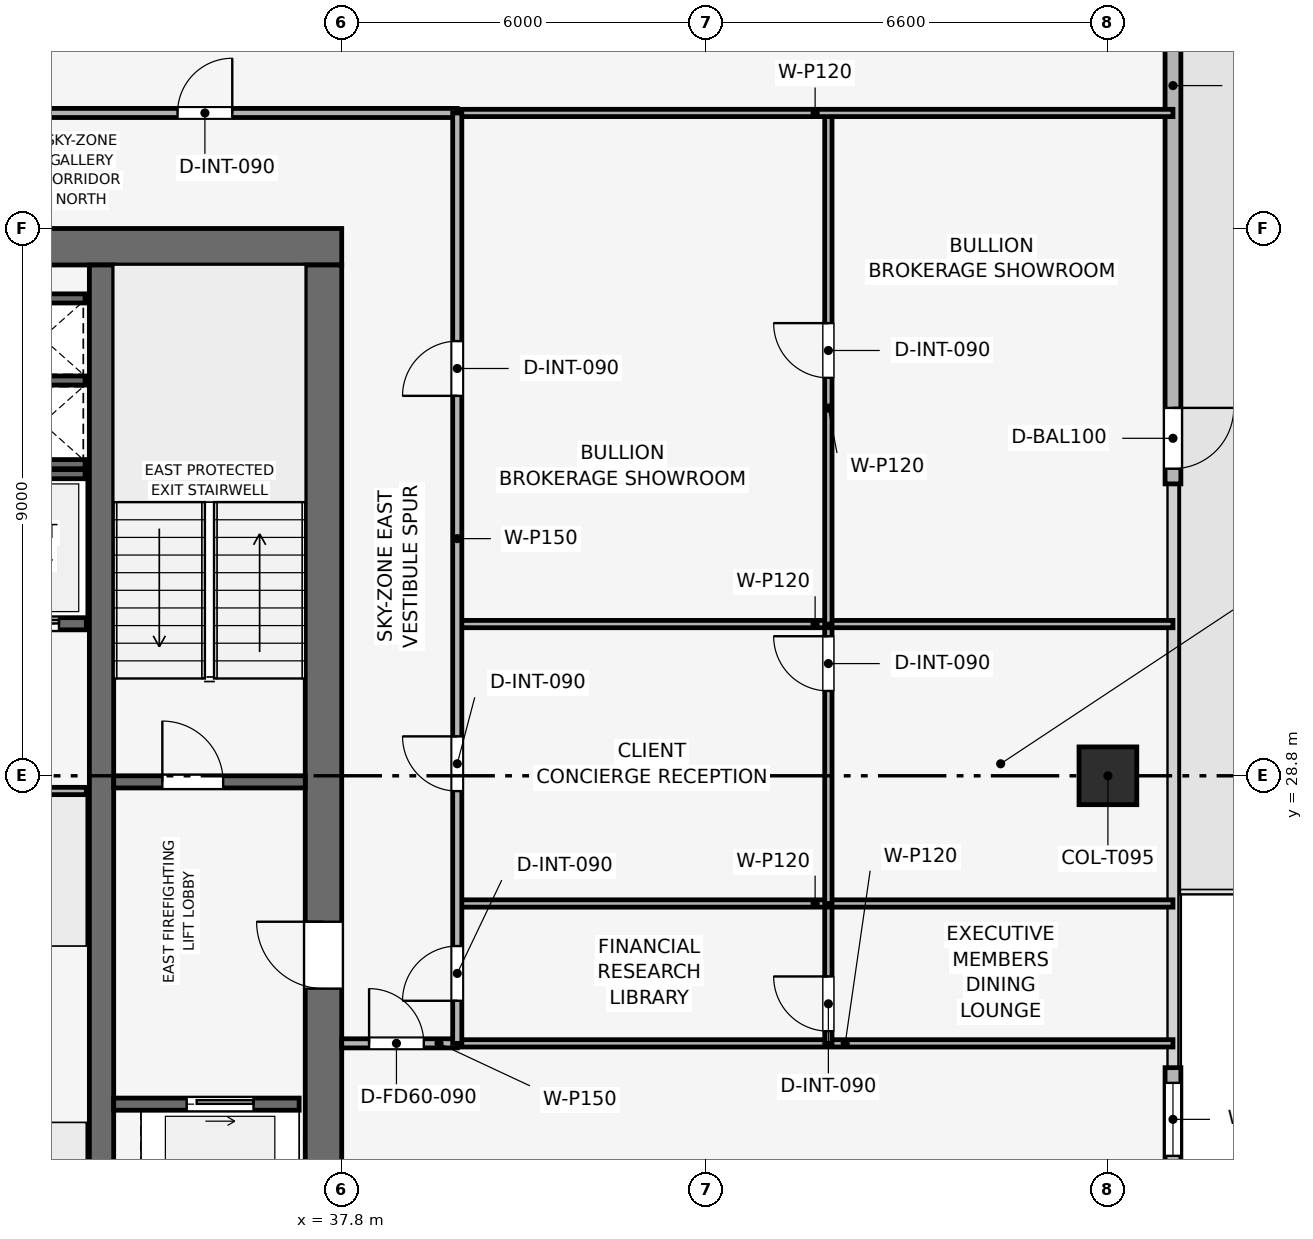
"""IFC4 building model, lengths in metres.
Left out: names, types, materials, properties, quantities, classifications, styles, units other than length and angle.
Written with IfcOpenShell. Run it as: python <this file> out.ifc"""

import sys

from ifc_helpers import new_model, si_unit, direction, frame, frame_2d, origin, origin_2d, place, context, subcontext, project, spatial, rectangle, extrude, element, fill, save


model = new_model("IFC4")
c1 = context("Model", 3, precision=1e-05, world=origin(), true_north=direction((0.0, 1.0)))
c2 = subcontext(c1, "Body", "Model", "MODEL_VIEW")
j1 = project(units=[si_unit("LENGTHUNIT", "METRE"), si_unit("PLANEANGLEUNIT", "RADIAN")], contexts=[c1])
p1 = place(None, origin())
s1 = spatial("IfcSite", under=j1, at=p1, CompositionType="ELEMENT")
p2 = place(p1, origin())
s2 = spatial("IfcBuilding", under=s1, at=p2, CompositionType="ELEMENT")
p3 = place(p2, frame((0.0, 0.0, 318.0)))
s3 = spatial("IfcBuildingStorey", under=s2, at=p3, CompositionType="ELEMENT", Elevation=318.0)
p4 = place(p3, frame((19.8, 37.5, 0.0), z_axis=(0.0, 0.0, 1.0), x_axis=(1.0, 0.0, 0.0)))
e1 = element("IfcWall", 1, at=p4, inside=s3, PredefinedType="SHEAR", context=c2, shape_type="SweptSolid", body=[
    extrude(rectangle(XDim=18.0, YDim=0.6, at=frame_2d((9.0, 0.0))), origin(), (0.0, 0.0, 1.0), 3.75),
])
p5 = place(p4, frame((7.05, 0.0, 0.0)))
e2 = element("IfcOpeningElement", 2, at=p5, cuts=e1, PredefinedType="OPENING", context=c2, shape_type="SweptSolid", body=[
    extrude(rectangle(XDim=1.1, YDim=2.15, at=frame_2d((0.55, 1.075))), frame((0.0, 0.31, 0.0), z_axis=(0.0, -1.0, 0.0), x_axis=(1.0, 0.0, 0.0)), (0.0, 0.0, 1.0), 0.62),
])
p6 = place(p3, frame((37.5, 20.4, 0.0), z_axis=(0.0, 0.0, 1.0), x_axis=(0.0, 1.0, 0.0)))
e3 = element("IfcWall", 3, at=p6, inside=s3, PredefinedType="SHEAR", context=c2, shape_type="SweptSolid", body=[
    extrude(rectangle(XDim=16.8, YDim=0.6, at=frame_2d((8.4, 0.0))), origin(), (0.0, 0.0, 1.0), 3.75),
])
p7 = place(p6, frame((4.9, 0.0, 0.0)))
e4 = element("IfcOpeningElement", 4, at=p7, cuts=e3, PredefinedType="OPENING", context=c2, shape_type="SweptSolid", body=[
    extrude(rectangle(XDim=1.1, YDim=2.15, at=frame_2d((0.55, 1.075))), frame((0.0, 0.31, 0.0), z_axis=(0.0, -1.0, 0.0), x_axis=(1.0, 0.0, 0.0)), (0.0, 0.0, 1.0), 0.62),
])
p8 = place(p3, frame((33.85, 20.4, 0.0), z_axis=(0.0, 0.0, 1.0), x_axis=(0.0, 1.0, 0.0)))
e5 = element("IfcWall", 5, at=p8, inside=s3, PredefinedType="SHEAR", context=c2, shape_type="SweptSolid", body=[
    extrude(rectangle(XDim=16.8, YDim=0.4, at=frame_2d((8.4, 0.0))), origin(), (0.0, 0.0, 1.0), 3.75),
])
p9 = place(p3, frame((50.4, 28.8, 0.003), z_axis=(0.0, 0.0, 1.0), x_axis=(1.0, 0.0, 0.0)))
e6 = element("IfcColumn", 6, at=p9, inside=s3, PredefinedType="COLUMN", context=c2, shape_type="SweptSolid", body=[
    extrude(rectangle(XDim=0.95, YDim=0.95, at=origin_2d()), origin(), (0.0, 0.0, 1.0), 3.504),
])
p10 = place(p3, frame((51.47, 45.3, 0.0), z_axis=(0.0, 0.0, 1.0), x_axis=(0.0, -1.0, 0.0)))
e7 = element("IfcWall", 7, at=p10, inside=s3, PredefinedType="SOLIDWALL", context=c2, shape_type="SweptSolid", body=[
    extrude(rectangle(XDim=11.7, YDim=0.26, at=frame_2d((5.85, 0.0))), origin(), (0.0, 0.0, 1.0), 3.51),
])
p11 = place(p10, frame((10.45, 0.0, 0.0)))
e8 = element("IfcOpeningElement", 8, at=p11, cuts=e7, PredefinedType="OPENING", context=c2, shape_type="SweptSolid", body=[
    extrude(rectangle(XDim=1.0, YDim=2.2, at=frame_2d((0.5, 1.1))), frame((0.0, 0.14, 0.0), z_axis=(0.0, -1.0, 0.0), x_axis=(1.0, 0.0, 0.0)), (0.0, 0.0, 1.0), 0.28),
])
p12 = place(p3, frame((51.47, 24.0, 0.0), z_axis=(0.0, 0.0, 1.0), x_axis=(0.0, -1.0, 0.0)))
e9 = element("IfcWall", 9, at=p12, inside=s3, PredefinedType="SOLIDWALL", context=c2, shape_type="SweptSolid", body=[
    extrude(rectangle(XDim=11.7, YDim=0.26, at=frame_2d((5.85, 0.0))), origin(), (0.0, 0.0, 1.0), 3.51),
])
p13 = place(p12, frame((0.25, 0.0, 0.9)))
e10 = element("IfcOpeningElement", 10, at=p13, cuts=e9, PredefinedType="OPENING", context=c2, shape_type="SweptSolid", body=[
    extrude(rectangle(XDim=1.2, YDim=2.1, at=frame_2d((0.6, 1.05))), frame((0.0, 0.14, 0.0), z_axis=(0.0, -1.0, 0.0), x_axis=(1.0, 0.0, 0.0)), (0.0, 0.0, 1.0), 0.28),
])
p14 = place(p3, frame((34.05, 28.7, 0.0), z_axis=(0.0, 0.0, 1.0), x_axis=(1.0, 0.0, 0.0)))
e11 = element("IfcWall", 11, at=p14, inside=s3, PredefinedType="SHEAR", context=c2, shape_type="SweptSolid", body=[
    extrude(rectangle(XDim=3.15, YDim=0.2, at=frame_2d((1.575, 0.0))), origin(), (0.0, 0.0, 1.0), 3.51),
])
p15 = place(p14, frame((0.8, 0.0, 0.0)))
e12 = element("IfcOpeningElement", 12, at=p15, cuts=e11, PredefinedType="OPENING", context=c2, shape_type="SweptSolid", body=[
    extrude(rectangle(XDim=1.0, YDim=2.1, at=frame_2d((0.5, 1.05))), frame((0.0, 0.11, 0.0), z_axis=(0.0, -1.0, 0.0), x_axis=(1.0, 0.0, 0.0)), (0.0, 0.0, 1.0), 0.22),
])
for number, where, z_axis, x_axis in (
    (13, (32.25, 33.925, 0.0), (0.0, 0.0, 1.0), (1.0, 0.0, 0.0)),
    (14, (32.25, 35.3, 0.0), (0.0, 0.0, 1.0), (1.0, 0.0, 0.0)),
):
    element("IfcWall", number, at=place(p3, frame(where, z_axis=z_axis, x_axis=x_axis)), inside=s3, PredefinedType="SHEAR", context=c2, shape_type="SweptSolid", body=[
        extrude(rectangle(XDim=1.33, YDim=0.15, at=frame_2d((0.665, 0.0))), origin(), (0.0, 0.0, 1.0), 3.51),
    ])
p16 = place(p3, frame((34.05, 23.4, 0.0), z_axis=(0.0, 0.0, 1.0), x_axis=(1.0, 0.0, 0.0)))
e15 = element("IfcWall", 15, at=p16, inside=s3, PredefinedType="SHEAR", context=c2, shape_type="SweptSolid", body=[
    extrude(rectangle(XDim=3.05, YDim=0.2, at=frame_2d((1.525, 0.0))), origin(), (0.0, 0.0, 1.0), 3.51),
])
p17 = place(p16, frame((1.2, 0.0, 0.0)))
e16 = element("IfcOpeningElement", 16, at=p17, cuts=e15, PredefinedType="OPENING", context=c2, shape_type="SweptSolid", body=[
    extrude(rectangle(XDim=1.1, YDim=2.15, at=frame_2d((0.55, 1.075))), frame((0.0, 0.11, 0.0), z_axis=(0.0, -1.0, 0.0), x_axis=(1.0, 0.0, 0.0)), (0.0, 0.0, 1.0), 0.22),
])
p18 = place(p3, frame((31.6, 31.3, 0.0), z_axis=(0.0, 0.0, 1.0), x_axis=(1.0, 0.0, 0.0)))
e17 = element("IfcWall", 17, at=p18, inside=s3, PredefinedType="SHEAR", context=c2, shape_type="SweptSolid", body=[
    extrude(rectangle(XDim=2.0, YDim=0.2, at=frame_2d((1.0, 0.0))), origin(), (0.0, 0.0, 1.0), 3.51),
])
p19 = place(p18, frame((0.45, 0.0, 0.0)))
e18 = element("IfcOpeningElement", 18, at=p19, cuts=e17, PredefinedType="OPENING", context=c2, shape_type="SweptSolid", body=[
    extrude(rectangle(XDim=1.1, YDim=2.15, at=frame_2d((0.55, 1.075))), frame((0.0, 0.11, 0.0), z_axis=(0.0, -1.0, 0.0), x_axis=(1.0, 0.0, 0.0)), (0.0, 0.0, 1.0), 0.22),
])
p20 = place(p3, frame((32.25, 36.65, 0.0), z_axis=(0.0, 0.0, 1.0), x_axis=(1.0, 0.0, 0.0)))
e19 = element("IfcWall", 19, at=p20, inside=s3, PredefinedType="SHEAR", context=c2, shape_type="SweptSolid", body=[
    extrude(rectangle(XDim=1.33, YDim=0.15, at=frame_2d((0.665, 0.0))), origin(), (0.0, 0.0, 1.0), 3.51),
])
p21 = place(p3, frame((29.5, 33.76, 0.0), z_axis=(0.0, 0.0, 1.0), x_axis=(1.0, 0.0, 0.0)))
e20 = element("IfcWall", 20, at=p21, inside=s3, PredefinedType="SHEAR", context=c2, shape_type="SweptSolid", body=[
    extrude(rectangle(XDim=4.08, YDim=0.15, at=frame_2d((2.04, 0.0))), origin(), (0.0, 0.0, 1.0), 3.51),
])
p22 = place(p3, frame((29.55, 28.55, 0.0), z_axis=(0.0, 0.0, 1.0), x_axis=(1.0, 0.0, 0.0)))
e21 = element("IfcWall", 21, at=p22, inside=s3, PredefinedType="PARTITIONING", context=c2, shape_type="SweptSolid", body=[
    extrude(rectangle(XDim=4.05, YDim=0.12, at=frame_2d((2.025, 0.0))), origin(), (0.0, 0.0, 1.0), 3.51),
])
p23 = place(p22, frame((1.575, 0.0, 0.0)))
e22 = element("IfcOpeningElement", 22, at=p23, cuts=e21, PredefinedType="OPENING", context=c2, shape_type="SweptSolid", body=[
    extrude(rectangle(XDim=0.9, YDim=2.1, at=frame_2d((0.45, 1.05))), frame((0.0, 0.07, 0.0), z_axis=(0.0, -1.0, 0.0), x_axis=(1.0, 0.0, 0.0)), (0.0, 0.0, 1.0), 0.14),
])
p24 = place(p3, frame((37.8, 24.4, 0.0), z_axis=(0.0, 0.0, 1.0), x_axis=(1.0, 0.0, 0.0)))
e23 = element("IfcWall", 23, at=p24, inside=s3, PredefinedType="PARTITIONING", context=c2, shape_type="SweptSolid", body=[
    extrude(rectangle(XDim=1.9, YDim=0.15, at=frame_2d((0.95, 0.0))), origin(), (0.0, 0.0, 1.0), 3.51),
])
p25 = place(p24, frame((0.45, 0.0, 0.0)))
e24 = element("IfcOpeningElement", 24, at=p25, cuts=e23, PredefinedType="OPENING", context=c2, shape_type="SweptSolid", body=[
    extrude(rectangle(XDim=0.9, YDim=2.1, at=frame_2d((0.45, 1.05))), frame((0.0, 0.085, 0.0), z_axis=(0.0, -1.0, 0.0), x_axis=(1.0, 0.0, 0.0)), (0.0, 0.0, 1.0), 0.17),
])
p26 = place(p3, frame((39.7, 24.4, 0.0), z_axis=(0.0, 0.0, 1.0), x_axis=(1.0, 0.0, 0.0)))
e25 = element("IfcWall", 25, at=p26, inside=s3, PredefinedType="PARTITIONING", context=c2, shape_type="SweptSolid", body=[
    extrude(rectangle(XDim=11.77, YDim=0.12, at=frame_2d((5.885, 0.0))), origin(), (0.0, 0.0, 1.0), 3.135),
])
p27 = place(p3, frame((45.803, 24.4, 0.0), z_axis=(0.0, 0.0, 1.0), x_axis=(0.0, 1.0, 0.0)))
e26 = element("IfcWall", 26, at=p27, inside=s3, PredefinedType="PARTITIONING", context=c2, shape_type="SweptSolid", body=[
    extrude(rectangle(XDim=2.3, YDim=0.12, at=frame_2d((1.15, 0.0))), origin(), (0.0, 0.0, 1.0), 3.51),
])
p28 = place(p27, frame((0.2, 0.0, 0.0)))
e27 = element("IfcOpeningElement", 27, at=p28, cuts=e26, PredefinedType="OPENING", context=c2, shape_type="SweptSolid", body=[
    extrude(rectangle(XDim=0.9, YDim=2.1, at=frame_2d((0.45, 1.05))), frame((0.0, 0.07, 0.0), z_axis=(0.0, -1.0, 0.0), x_axis=(1.0, 0.0, 0.0)), (0.0, 0.0, 1.0), 0.14),
])
p29 = place(p3, frame((39.7, 26.7, 0.0), z_axis=(0.0, 0.0, 1.0), x_axis=(1.0, 0.0, 0.0)))
e28 = element("IfcWall", 28, at=p29, inside=s3, PredefinedType="PARTITIONING", context=c2, shape_type="SweptSolid", body=[
    extrude(rectangle(XDim=11.77, YDim=0.12, at=frame_2d((5.885, 0.0))), origin(), (0.0, 0.0, 1.0), 3.135),
])
p30 = place(p3, frame((45.803, 26.7, 0.0), z_axis=(0.0, 0.0, 1.0), x_axis=(0.0, 1.0, 0.0)))
e29 = element("IfcWall", 29, at=p30, inside=s3, PredefinedType="PARTITIONING", context=c2, shape_type="SweptSolid", body=[
    extrude(rectangle(XDim=4.595, YDim=0.12, at=frame_2d((2.297, 0.0))), origin(), (0.0, 0.0, 1.0), 3.095),
])
p31 = place(p30, frame((3.495, 0.0, 0.0)))
e30 = element("IfcOpeningElement", 30, at=p31, cuts=e29, PredefinedType="OPENING", context=c2, shape_type="SweptSolid", body=[
    extrude(rectangle(XDim=0.9, YDim=2.1, at=frame_2d((0.45, 1.05))), frame((0.0, 0.07, 0.0), z_axis=(0.0, -1.0, 0.0), x_axis=(1.0, 0.0, 0.0)), (0.0, 0.0, 1.0), 0.14),
])
p32 = place(p3, frame((39.7, 31.295, 0.0), z_axis=(0.0, 0.0, 1.0), x_axis=(1.0, 0.0, 0.0)))
e31 = element("IfcWall", 31, at=p32, inside=s3, PredefinedType="PARTITIONING", context=c2, shape_type="SweptSolid", body=[
    extrude(rectangle(XDim=11.77, YDim=0.12, at=frame_2d((5.885, 0.0))), origin(), (0.0, 0.0, 1.0), 3.135),
])
p33 = place(p3, frame((45.803, 31.295, 0.0), z_axis=(0.0, 0.0, 1.0), x_axis=(0.0, 1.0, 0.0)))
e32 = element("IfcWall", 32, at=p33, inside=s3, PredefinedType="PARTITIONING", context=c2, shape_type="SweptSolid", body=[
    extrude(rectangle(XDim=8.405, YDim=0.12, at=frame_2d((4.203, 0.0))), origin(), (0.0, 0.0, 1.0), 3.095),
])
p34 = place(p33, frame((4.049, 0.0, 0.0)))
e33 = element("IfcOpeningElement", 33, at=p34, cuts=e32, PredefinedType="OPENING", context=c2, shape_type="SweptSolid", body=[
    extrude(rectangle(XDim=0.9, YDim=2.1, at=frame_2d((0.45, 1.05))), frame((0.0, 0.07, 0.0), z_axis=(0.0, -1.0, 0.0), x_axis=(1.0, 0.0, 0.0)), (0.0, 0.0, 1.0), 0.14),
])
p35 = place(p3, frame((39.7, 39.7, 0.0), z_axis=(0.0, 0.0, 1.0), x_axis=(1.0, 0.0, 0.0)))
e34 = element("IfcWall", 34, at=p35, inside=s3, PredefinedType="PARTITIONING", context=c2, shape_type="SweptSolid", body=[
    extrude(rectangle(XDim=11.77, YDim=0.12, at=frame_2d((5.885, 0.0))), origin(), (0.0, 0.0, 1.0), 3.095),
])
p36 = place(p3, frame((17.9, 39.7, 0.0), z_axis=(0.0, 0.0, 1.0), x_axis=(1.0, 0.0, 0.0)))
e35 = element("IfcWall", 35, at=p36, inside=s3, PredefinedType="PARTITIONING", context=c2, shape_type="SweptSolid", body=[
    extrude(rectangle(XDim=21.8, YDim=0.15, at=frame_2d((10.9, 0.0))), origin(), (0.0, 0.0, 1.0), 3.095),
])
p37 = place(p36, frame((2.1, 0.0, 0.0)))
e36 = element("IfcOpeningElement", 36, at=p37, cuts=e35, PredefinedType="OPENING", context=c2, shape_type="SweptSolid", body=[
    extrude(rectangle(XDim=0.9, YDim=2.1, at=frame_2d((0.45, 1.05))), frame((0.0, 0.085, 0.0), z_axis=(0.0, -1.0, 0.0), x_axis=(1.0, 0.0, 0.0)), (0.0, 0.0, 1.0), 0.17),
])
p38 = place(p36, frame((6.05, 0.0, 0.0)))
e37 = element("IfcOpeningElement", 37, at=p38, cuts=e35, PredefinedType="OPENING", context=c2, shape_type="SweptSolid", body=[
    extrude(rectangle(XDim=0.9, YDim=2.1, at=frame_2d((0.45, 1.05))), frame((0.0, 0.085, 0.0), z_axis=(0.0, -1.0, 0.0), x_axis=(1.0, 0.0, 0.0)), (0.0, 0.0, 1.0), 0.17),
])
p39 = place(p36, frame((8.95, 0.0, 0.0)))
e38 = element("IfcOpeningElement", 38, at=p39, cuts=e35, PredefinedType="OPENING", context=c2, shape_type="SweptSolid", body=[
    extrude(rectangle(XDim=0.9, YDim=2.1, at=frame_2d((0.45, 1.05))), frame((0.0, 0.085, 0.0), z_axis=(0.0, -1.0, 0.0), x_axis=(1.0, 0.0, 0.0)), (0.0, 0.0, 1.0), 0.17),
])
p40 = place(p36, frame((11.7, 0.0, 0.0)))
e39 = element("IfcOpeningElement", 39, at=p40, cuts=e35, PredefinedType="OPENING", context=c2, shape_type="SweptSolid", body=[
    extrude(rectangle(XDim=0.95, YDim=2.1, at=frame_2d((0.475, 1.05))), frame((0.0, 0.085, 0.0), z_axis=(0.0, -1.0, 0.0), x_axis=(1.0, 0.0, 0.0)), (0.0, 0.0, 1.0), 0.17),
])
p41 = place(p36, frame((17.2, 0.0, 0.0)))
e40 = element("IfcOpeningElement", 40, at=p41, cuts=e35, PredefinedType="OPENING", context=c2, shape_type="SweptSolid", body=[
    extrude(rectangle(XDim=0.9, YDim=2.1, at=frame_2d((0.45, 1.05))), frame((0.0, 0.085, 0.0), z_axis=(0.0, -1.0, 0.0), x_axis=(1.0, 0.0, 0.0)), (0.0, 0.0, 1.0), 0.17),
])
p42 = place(p3, frame((39.7, 24.4, 0.0), z_axis=(0.0, 0.0, 1.0), x_axis=(0.0, 1.0, 0.0)))
e41 = element("IfcWall", 41, at=p42, inside=s3, PredefinedType="PARTITIONING", context=c2, shape_type="SweptSolid", body=[
    extrude(rectangle(XDim=15.3, YDim=0.15, at=frame_2d((7.65, 0.0))), origin(), (0.0, 0.0, 1.0), 3.095),
])
p43 = place(p42, frame((0.7, 0.0, 0.0)))
e42 = element("IfcOpeningElement", 42, at=p43, cuts=e41, PredefinedType="OPENING", context=c2, shape_type="SweptSolid", body=[
    extrude(rectangle(XDim=0.9, YDim=2.1, at=frame_2d((0.45, 1.05))), frame((0.0, 0.085, 0.0), z_axis=(0.0, -1.0, 0.0), x_axis=(1.0, 0.0, 0.0)), (0.0, 0.0, 1.0), 0.17),
])
p44 = place(p42, frame((4.148, 0.0, 0.0)))
e43 = element("IfcOpeningElement", 43, at=p44, cuts=e41, PredefinedType="OPENING", context=c2, shape_type="SweptSolid", body=[
    extrude(rectangle(XDim=0.9, YDim=2.1, at=frame_2d((0.45, 1.05))), frame((0.0, 0.085, 0.0), z_axis=(0.0, -1.0, 0.0), x_axis=(1.0, 0.0, 0.0)), (0.0, 0.0, 1.0), 0.17),
])
p45 = place(p42, frame((10.648, 0.0, 0.0)))
e44 = element("IfcOpeningElement", 44, at=p45, cuts=e41, PredefinedType="OPENING", context=c2, shape_type="SweptSolid", body=[
    extrude(rectangle(XDim=0.9, YDim=2.1, at=frame_2d((0.45, 1.05))), frame((0.0, 0.085, 0.0), z_axis=(0.0, -1.0, 0.0), x_axis=(1.0, 0.0, 0.0)), (0.0, 0.0, 1.0), 0.17),
])
p46 = place(p11, origin())
e45 = element("IfcDoor", 45, at=p46, inside=s3, OperationType="SINGLE_SWING_LEFT", PredefinedType="DOOR", context=c2, shape_type="SweptSolid", body=[
    extrude(rectangle(XDim=1.0, YDim=2.2, at=frame_2d((0.5, 1.1))), frame((0.0, 0.025, 0.0), z_axis=(0.0, -1.0, 0.0), x_axis=(1.0, 0.0, 0.0)), (0.0, 0.0, 1.0), 0.05),
])
fill(e8, e45)
p47 = place(p13, origin())
e46 = element("IfcWindow", 46, at=p47, inside=s3, PartitioningType="SINGLE_PANEL", PredefinedType="WINDOW", context=c2, shape_type="SweptSolid", body=[
    extrude(rectangle(XDim=1.2, YDim=2.1, at=frame_2d((0.6, 1.05))), frame((0.0, 0.03, 0.0), z_axis=(0.0, -1.0, 0.0), x_axis=(1.0, 0.0, 0.0)), (0.0, 0.0, 1.0), 0.06),
])
fill(e10, e46)
p48 = place(p15, origin())
e47 = element("IfcDoor", 47, at=p48, inside=s3, OperationType="SINGLE_SWING_LEFT", PredefinedType="DOOR", context=c2, shape_type="SweptSolid", body=[
    extrude(rectangle(XDim=1.0, YDim=2.1, at=frame_2d((0.5, 1.05))), frame((0.0, 0.025, 0.0), z_axis=(0.0, -1.0, 0.0), x_axis=(1.0, 0.0, 0.0)), (0.0, 0.0, 1.0), 0.05),
])
fill(e12, e47)
p49 = place(p17, origin())
e48 = element("IfcDoor", 48, at=p49, inside=s3, OperationType="SLIDING_TO_RIGHT", PredefinedType="DOOR", context=c2, shape_type="SweptSolid", body=[
    extrude(rectangle(XDim=1.1, YDim=2.15, at=frame_2d((0.55, 1.075))), frame((0.0, 0.025, 0.0), z_axis=(0.0, -1.0, 0.0), x_axis=(1.0, 0.0, 0.0)), (0.0, 0.0, 1.0), 0.05),
])
fill(e16, e48)
p50 = place(p19, origin())
e49 = element("IfcDoor", 49, at=p50, inside=s3, OperationType="SLIDING_TO_RIGHT", PredefinedType="DOOR", context=c2, shape_type="SweptSolid", body=[
    extrude(rectangle(XDim=1.1, YDim=2.15, at=frame_2d((0.55, 1.075))), frame((0.0, 0.025, 0.0), z_axis=(0.0, -1.0, 0.0), x_axis=(1.0, 0.0, 0.0)), (0.0, 0.0, 1.0), 0.05),
])
fill(e18, e49)
p51 = place(p25, origin())
e50 = element("IfcDoor", 50, at=p51, inside=s3, OperationType="SINGLE_SWING_LEFT", PredefinedType="DOOR", context=c2, shape_type="SweptSolid", body=[
    extrude(rectangle(XDim=0.9, YDim=2.1, at=frame_2d((0.45, 1.05))), frame((0.0, 0.025, 0.0), z_axis=(0.0, -1.0, 0.0), x_axis=(1.0, 0.0, 0.0)), (0.0, 0.0, 1.0), 0.05),
])
fill(e24, e50)
p52 = place(p28, origin())
e51 = element("IfcDoor", 51, at=p52, inside=s3, OperationType="SINGLE_SWING_RIGHT", PredefinedType="DOOR", context=c2, shape_type="SweptSolid", body=[
    extrude(rectangle(XDim=0.9, YDim=2.1, at=frame_2d((0.45, 1.05))), frame((0.0, 0.025, 0.0), z_axis=(0.0, -1.0, 0.0), x_axis=(1.0, 0.0, 0.0)), (0.0, 0.0, 1.0), 0.05),
])
fill(e27, e51)
p53 = place(p31, origin())
e52 = element("IfcDoor", 52, at=p53, inside=s3, OperationType="SINGLE_SWING_RIGHT", PredefinedType="DOOR", context=c2, shape_type="SweptSolid", body=[
    extrude(rectangle(XDim=0.9, YDim=2.1, at=frame_2d((0.45, 1.05))), frame((0.0, 0.025, 0.0), z_axis=(0.0, -1.0, 0.0), x_axis=(1.0, 0.0, 0.0)), (0.0, 0.0, 1.0), 0.05),
])
fill(e30, e52)
p54 = place(p34, origin())
e53 = element("IfcDoor", 53, at=p54, inside=s3, OperationType="SINGLE_SWING_RIGHT", PredefinedType="DOOR", context=c2, shape_type="SweptSolid", body=[
    extrude(rectangle(XDim=0.9, YDim=2.1, at=frame_2d((0.45, 1.05))), frame((0.0, 0.025, 0.0), z_axis=(0.0, -1.0, 0.0), x_axis=(1.0, 0.0, 0.0)), (0.0, 0.0, 1.0), 0.05),
])
fill(e33, e53)
p55 = place(p41, origin())
e54 = element("IfcDoor", 54, at=p55, inside=s3, OperationType="SINGLE_SWING_RIGHT", PredefinedType="DOOR", context=c2, shape_type="SweptSolid", body=[
    extrude(rectangle(XDim=0.9, YDim=2.1, at=frame_2d((0.45, 1.05))), frame((0.0, 0.025, 0.0), z_axis=(0.0, -1.0, 0.0), x_axis=(1.0, 0.0, 0.0)), (0.0, 0.0, 1.0), 0.05),
])
fill(e40, e54)
p56 = place(p43, origin())
e55 = element("IfcDoor", 55, at=p56, inside=s3, OperationType="SINGLE_SWING_LEFT", PredefinedType="DOOR", context=c2, shape_type="SweptSolid", body=[
    extrude(rectangle(XDim=0.9, YDim=2.1, at=frame_2d((0.45, 1.05))), frame((0.0, 0.025, 0.0), z_axis=(0.0, -1.0, 0.0), x_axis=(1.0, 0.0, 0.0)), (0.0, 0.0, 1.0), 0.05),
])
fill(e42, e55)
p57 = place(p44, origin())
e56 = element("IfcDoor", 56, at=p57, inside=s3, OperationType="SINGLE_SWING_RIGHT", PredefinedType="DOOR", context=c2, shape_type="SweptSolid", body=[
    extrude(rectangle(XDim=0.9, YDim=2.1, at=frame_2d((0.45, 1.05))), frame((0.0, 0.025, 0.0), z_axis=(0.0, -1.0, 0.0), x_axis=(1.0, 0.0, 0.0)), (0.0, 0.0, 1.0), 0.05),
])
fill(e43, e56)
p58 = place(p45, origin())
e57 = element("IfcDoor", 57, at=p58, inside=s3, OperationType="SINGLE_SWING_LEFT", PredefinedType="DOOR", context=c2, shape_type="SweptSolid", body=[
    extrude(rectangle(XDim=0.9, YDim=2.1, at=frame_2d((0.45, 1.05))), frame((0.0, 0.025, 0.0), z_axis=(0.0, -1.0, 0.0), x_axis=(1.0, 0.0, 0.0)), (0.0, 0.0, 1.0), 0.05),
])
fill(e44, e57)
p59 = place(p7, origin())
e58 = element("IfcDoor", 58, at=p59, inside=s3, OperationType="SINGLE_SWING_RIGHT", PredefinedType="DOOR", context=c2, shape_type="SweptSolid", body=[
    extrude(rectangle(XDim=1.1, YDim=2.15, at=frame_2d((0.55, 1.075))), frame((0.0, 0.025, 0.0), z_axis=(0.0, -1.0, 0.0), x_axis=(1.0, 0.0, 0.0)), (0.0, 0.0, 1.0), 0.05),
])
fill(e4, e58)
save(model, sys.argv[1])
